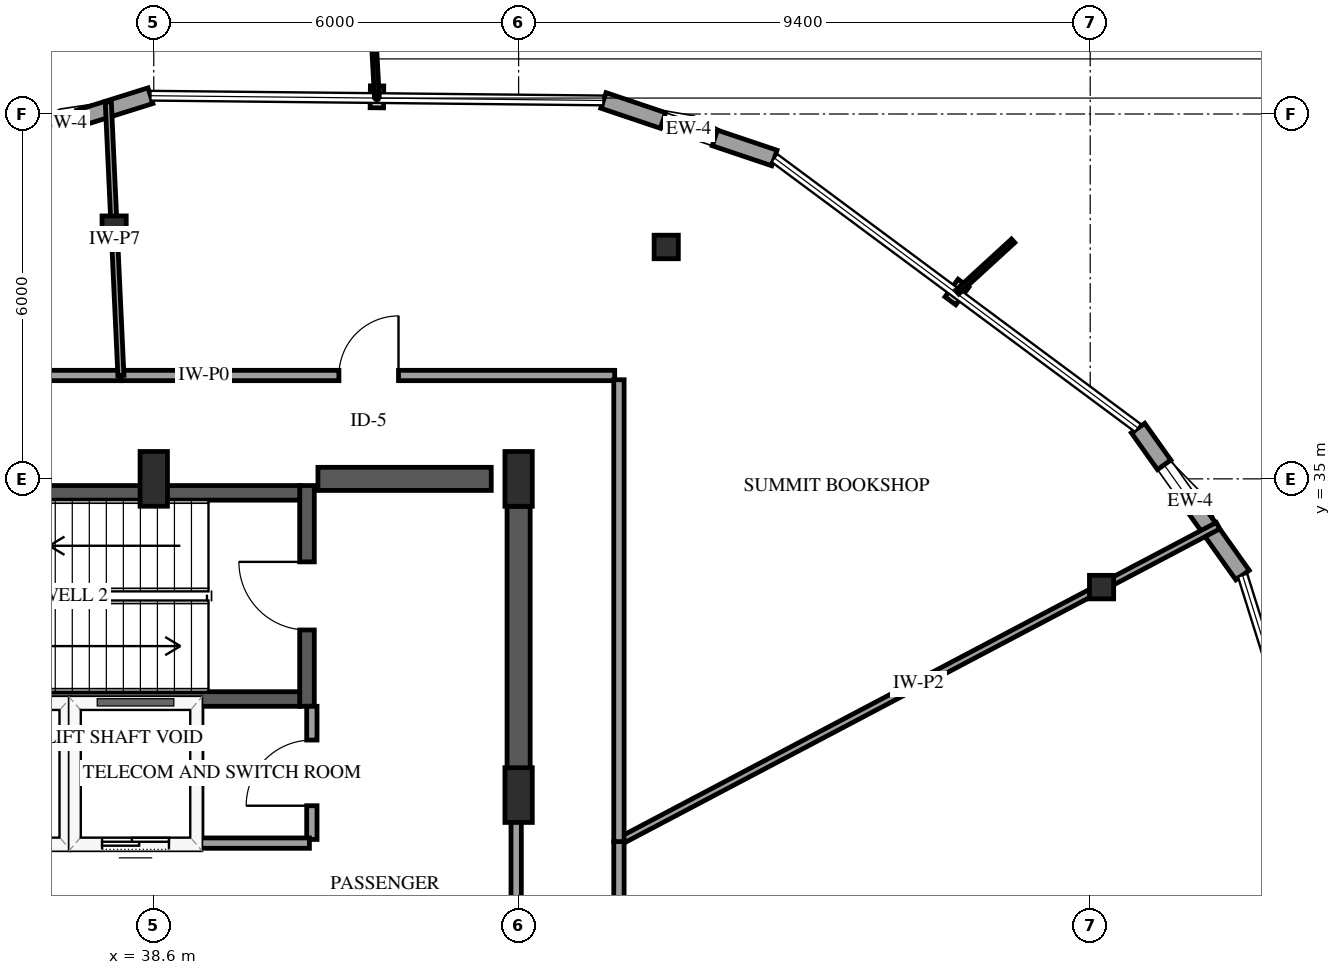
"""IFC4 building model, lengths in metres.
Left out: names, types, materials, properties, quantities, classifications, styles, units other than length and angle.
Written with IfcOpenShell. Run it as: python <this file> out.ifc"""

import sys

from ifc_helpers import new_model, si_unit, direction, frame, frame_2d, origin, origin_2d, place, context, subcontext, project, spatial, rectangle, i_section, extrude, element, fill, save


model = new_model("IFC4")
c1 = context("Model", 3, precision=1e-05, world=origin(), true_north=direction((0.0, 1.0)))
c2 = subcontext(c1, "Body", "Model", "MODEL_VIEW")
j1 = project(units=[si_unit("LENGTHUNIT", "METRE"), si_unit("PLANEANGLEUNIT", "RADIAN")], contexts=[c1])
p1 = place(None, origin())
s1 = spatial("IfcSite", under=j1, at=p1, CompositionType="ELEMENT")
p2 = place(p1, origin())
s2 = spatial("IfcBuilding", under=s1, at=p2, CompositionType="ELEMENT")
p3 = place(p2, frame((0.0, 0.0, 297.25)))
s3 = spatial("IfcBuildingStorey", under=s2, at=p3, CompositionType="ELEMENT", Elevation=297.25)
p4 = place(p3, frame((41.12, 31.26, 0.0), z_axis=(0.0, 0.0, 1.0), x_axis=(0.0, 1.0, 0.0)))
e1 = element("IfcWall", 1, at=p4, inside=s3, PredefinedType="SHEAR", context=c2, shape_type="SweptSolid", body=[
    extrude(rectangle(XDim=3.63, YDim=0.24, at=frame_2d((1.815, 0.0))), origin(), (0.0, 0.0, 1.0), 4.2),
])
p5 = place(p4, frame((1.255, 0.0, 0.0)))
e2 = element("IfcOpeningElement", 2, at=p5, cuts=e1, PredefinedType="OPENING", context=c2, shape_type="SweptSolid", body=[
    extrude(rectangle(XDim=1.12, YDim=2.15, at=frame_2d((0.56, 1.075))), frame((0.0, 0.13, 0.0), z_axis=(0.0, -1.0, 0.0), x_axis=(1.0, 0.0, 0.0)), (0.0, 0.0, 1.0), 0.26),
])
for number, where, z_axis, x_axis in (
    (3, (33.0, 31.38, 0.0), (0.0, 0.0, 1.0), (1.0, 0.0, 0.0)),
    (4, (33.0, 34.77, 0.0), (0.0, 0.0, 1.0), (1.0, 0.0, 0.0)),
):
    element("IfcWall", number, at=place(p3, frame(where, z_axis=z_axis, x_axis=x_axis)), inside=s3, PredefinedType="SHEAR", context=c2, shape_type="SweptSolid", body=[
        extrude(rectangle(XDim=8.0, YDim=0.24, at=frame_2d((4.0, 0.0))), origin(), (0.0, 0.0, 1.0), 4.2),
    ])
p6 = place(p3, frame((41.3, 35.0, 0.0), z_axis=(0.0, 0.0, 1.0), x_axis=(1.0, 0.0, 0.0)))
e5 = element("IfcWall", 5, at=p6, inside=s3, PredefinedType="SHEAR", context=c2, shape_type="SweptSolid", body=[
    extrude(rectangle(XDim=2.85, YDim=0.38, at=frame_2d((1.425, 0.0))), origin(), (0.0, 0.0, 1.0), 4.2),
])
p7 = place(p3, frame((44.6, 29.8, 0.0), z_axis=(0.0, 0.0, 1.0), x_axis=(0.0, 1.0, 0.0)))
e6 = element("IfcWall", 6, at=p7, inside=s3, PredefinedType="SHEAR", context=c2, shape_type="SweptSolid", body=[
    extrude(rectangle(XDim=4.75, YDim=0.38, at=frame_2d((2.375, 0.0))), origin(), (0.0, 0.0, 1.0), 4.2),
])
for number, where, z_axis, x_axis in (
    (7, (38.6, 35.0, 0.0), (0.0, 0.0, 1.0), (1.0, 0.0, 0.0)),
    (8, (44.6, 29.8, 0.0), (0.0, 0.0, 1.0), (1.0, 0.0, 0.0)),
    (9, (44.6, 35.0, 0.0), (0.0, 0.0, 1.0), (1.0, 0.0, 0.0)),
):
    element("IfcColumn", number, at=place(p3, frame(where, z_axis=z_axis, x_axis=x_axis)), inside=s3, PredefinedType="PILASTER", context=c2, shape_type="SweptSolid", body=[
        extrude(rectangle(XDim=0.45, YDim=0.9, at=origin_2d()), origin(), (0.0, 0.0, 1.0), 4.2),
    ])
for number, where, z_axis, x_axis in (
    (10, (54.187, 33.22, 0.0), (0.0, 0.0, 1.0), (1.0, 0.0, 0.0)),
    (11, (47.028, 38.813, 0.0), (0.0, 0.0, 1.0), (1.0, 0.0, 0.0)),
    (12, (37.948, 39.131, 0.0), (0.0, 0.0, 1.0), (1.0, 0.0, 0.0)),
):
    element("IfcColumn", number, at=place(p3, frame(where, z_axis=z_axis, x_axis=x_axis)), inside=s3, PredefinedType="COLUMN", context=c2, shape_type="SweptSolid", body=[
        extrude(i_section(OverallWidth=0.398, OverallDepth=0.387, WebThickness=0.021, FlangeThickness=0.033, FilletRadius=0.038, at=origin_2d()), origin(), (0.0, 0.0, 1.0), 4.2),
    ])
p8 = place(p3, frame((38.546, 41.301, 0.0), z_axis=(0.0, 0.0, 1.0), x_axis=(-0.954232173164, -0.299066814772, 0.0)))
e13 = element("IfcWall", 13, at=p8, inside=s3, PredefinedType="SOLIDWALL", context=c2, shape_type="SweptSolid", body=[
    extrude(rectangle(XDim=2.967, YDim=0.27, at=frame_2d((1.483, 0.0))), origin(), (0.0, 0.0, 1.0), 3.274),
])
p9 = place(p8, frame((1.228, 0.0, 0.75)))
e14 = element("IfcOpeningElement", 14, at=p9, cuts=e13, PredefinedType="OPENING", context=c2, shape_type="SweptSolid", body=[
    extrude(rectangle(XDim=0.9, YDim=1.5, at=frame_2d((0.45, 0.75))), frame((0.0, 0.145, 0.0), z_axis=(0.0, -1.0, 0.0), x_axis=(1.0, 0.0, 0.0)), (0.0, 0.0, 1.0), 0.29),
])
p10 = place(p3, frame((56.505, 33.417, 0.0), z_axis=(0.0, 0.0, 1.0), x_axis=(-0.579274768915, 0.81513234637, 0.0)))
e15 = element("IfcWall", 15, at=p10, inside=s3, PredefinedType="SOLIDWALL", context=c2, shape_type="SweptSolid", body=[
    extrude(rectangle(XDim=2.967, YDim=0.27, at=frame_2d((1.483, 0.0))), origin(), (0.0, 0.0, 1.0), 3.274),
])
p11 = place(p10, frame((1.325, 0.0, 0.75)))
e16 = element("IfcOpeningElement", 16, at=p11, cuts=e15, PredefinedType="OPENING", context=c2, shape_type="SweptSolid", body=[
    extrude(rectangle(XDim=0.9, YDim=1.5, at=frame_2d((0.45, 0.75))), frame((0.0, 0.145, 0.0), z_axis=(0.0, -1.0, 0.0), x_axis=(1.0, 0.0, 0.0)), (0.0, 0.0, 1.0), 0.29),
])
p12 = place(p3, frame((48.806, 40.277, 0.0), z_axis=(0.0, 0.0, 1.0), x_axis=(-0.947790765735, 0.318892872903, 0.0)))
e17 = element("IfcWall", 17, at=p12, inside=s3, PredefinedType="SOLIDWALL", context=c2, shape_type="SweptSolid", body=[
    extrude(rectangle(XDim=2.967, YDim=0.27, at=frame_2d((1.483, 0.0))), origin(), (0.0, 0.0, 1.0), 3.274),
])
p13 = place(p12, frame((1.033, 0.0, 0.75)))
e18 = element("IfcOpeningElement", 18, at=p13, cuts=e17, PredefinedType="OPENING", context=c2, shape_type="SweptSolid", body=[
    extrude(rectangle(XDim=0.9, YDim=1.5, at=frame_2d((0.45, 0.75))), frame((0.0, 0.145, 0.0), z_axis=(0.0, -1.0, 0.0), x_axis=(1.0, 0.0, 0.0)), (0.0, 0.0, 1.0), 0.29),
])
p14 = place(p3, frame((35.15, 29.0, 0.0), z_axis=(0.0, 0.0, 1.0), x_axis=(1.0, 0.0, 0.0)))
e19 = element("IfcWall", 19, at=p14, inside=s3, PredefinedType="SOLIDWALL", context=c2, shape_type="SweptSolid", body=[
    extrude(rectangle(XDim=2.0, YDim=0.185, at=frame_2d((1.0, 0.0))), origin(), (0.0, 0.0, 1.0), 3.895),
])
p15 = place(p14, frame((0.45, 0.0, 0.0)))
e20 = element("IfcOpeningElement", 20, at=p15, cuts=e19, PredefinedType="OPENING", context=c2, shape_type="SweptSolid", body=[
    extrude(rectangle(XDim=1.1, YDim=2.15, at=frame_2d((0.55, 1.075))), frame((0.0, 0.103, 0.0), z_axis=(0.0, -1.0, 0.0), x_axis=(1.0, 0.0, 0.0)), (0.0, 0.0, 1.0), 0.205),
])
p16 = place(p3, frame((37.15, 29.11, 0.0), z_axis=(0.0, 0.0, 1.0), x_axis=(0.0, 1.0, 0.0)))
e21 = element("IfcWall", 21, at=p16, inside=s3, PredefinedType="SOLIDWALL", context=c2, shape_type="SweptSolid", body=[
    extrude(rectangle(XDim=2.1, YDim=0.185, at=frame_2d((1.05, 0.0))), origin(), (0.0, 0.0, 1.0), 3.895),
])
p17 = place(p3, frame((37.3, 29.0, 0.0), z_axis=(0.0, 0.0, 1.0), x_axis=(1.0, 0.0, 0.0)))
e22 = element("IfcWall", 22, at=p17, inside=s3, PredefinedType="SOLIDWALL", context=c2, shape_type="SweptSolid", body=[
    extrude(rectangle(XDim=2.0, YDim=0.185, at=frame_2d((1.0, 0.0))), origin(), (0.0, 0.0, 1.0), 3.895),
])
p18 = place(p17, frame((0.45, 0.0, 0.0)))
e23 = element("IfcOpeningElement", 23, at=p18, cuts=e22, PredefinedType="OPENING", context=c2, shape_type="SweptSolid", body=[
    extrude(rectangle(XDim=1.1, YDim=2.15, at=frame_2d((0.55, 1.075))), frame((0.0, 0.103, 0.0), z_axis=(0.0, -1.0, 0.0), x_axis=(1.0, 0.0, 0.0)), (0.0, 0.0, 1.0), 0.205),
])
p19 = place(p3, frame((39.3, 29.11, 0.0), z_axis=(0.0, 0.0, 1.0), x_axis=(0.0, 1.0, 0.0)))
e24 = element("IfcWall", 24, at=p19, inside=s3, PredefinedType="SOLIDWALL", context=c2, shape_type="SweptSolid", body=[
    extrude(rectangle(XDim=2.1, YDim=0.185, at=frame_2d((1.05, 0.0))), origin(), (0.0, 0.0, 1.0), 3.895),
])
p20 = place(p3, frame((56.102, 34.23, 0.0), z_axis=(0.0, 0.0, 1.0), x_axis=(-0.884556110355, -0.466433797697, 0.0)))
e25 = element("IfcWall", 25, at=p20, inside=s3, PredefinedType="PARTITIONING", context=c2, shape_type="SweptSolid", body=[
    extrude(rectangle(XDim=11.138, YDim=0.12, at=frame_2d((5.569, 0.0))), origin(), (0.0, 0.0, 1.0), 3.273),
])
p21 = place(p3, frame((46.25, 29.035, 0.0), z_axis=(0.0, 0.0, 1.0), x_axis=(0.0, -1.0, 0.0)))
e26 = element("IfcWall", 26, at=p21, inside=s3, PredefinedType="PARTITIONING", context=c2, shape_type="SweptSolid", body=[
    extrude(rectangle(XDim=8.656, YDim=0.17, at=frame_2d((4.328, 0.0))), origin(), (0.0, 0.0, 1.0), 3.895),
])
p22 = place(p21, frame((3.853, 0.0, 0.0)))
e27 = element("IfcOpeningElement", 27, at=p22, cuts=e26, PredefinedType="OPENING", context=c2, shape_type="SweptSolid", body=[
    extrude(rectangle(XDim=0.98, YDim=2.15, at=frame_2d((0.49, 1.075))), frame((0.0, 0.095, 0.0), z_axis=(0.0, -1.0, 0.0), x_axis=(1.0, 0.0, 0.0)), (0.0, 0.0, 1.0), 0.19),
])
p23 = place(p3, frame((38.06, 36.7, 0.0), z_axis=(0.0, 0.0, 1.0), x_axis=(1.0, 0.0, 0.0)))
e28 = element("IfcWall", 28, at=p23, inside=s3, PredefinedType="PARTITIONING", context=c2, shape_type="SweptSolid", body=[
    extrude(rectangle(XDim=8.12, YDim=0.17, at=frame_2d((4.06, 0.0))), origin(), (0.0, 0.0, 1.0), 3.895),
])
p24 = place(p23, frame((3.585, 0.0, 0.0)))
e29 = element("IfcOpeningElement", 29, at=p24, cuts=e28, PredefinedType="OPENING", context=c2, shape_type="SweptSolid", body=[
    extrude(rectangle(XDim=0.98, YDim=2.15, at=frame_2d((0.49, 1.075))), frame((0.0, 0.095, 0.0), z_axis=(0.0, -1.0, 0.0), x_axis=(1.0, 0.0, 0.0)), (0.0, 0.0, 1.0), 0.19),
])
p25 = place(p3, frame((46.25, 36.63, 0.0), z_axis=(0.0, 0.0, 1.0), x_axis=(0.0, -1.0, 0.0)))
e30 = element("IfcWall", 30, at=p25, inside=s3, PredefinedType="PARTITIONING", context=c2, shape_type="SweptSolid", body=[
    extrude(rectangle(XDim=7.595, YDim=0.17, at=frame_2d((3.797, 0.0))), origin(), (0.0, 0.0, 1.0), 3.895),
])
p26 = place(p3, frame((44.56, 29.8, 0.0), z_axis=(0.0, 0.0, 1.0), x_axis=(0.0, -1.0, 0.0)))
e31 = element("IfcWall", 31, at=p26, inside=s3, PredefinedType="PARTITIONING", context=c2, shape_type="SweptSolid", body=[
    extrude(rectangle(XDim=6.91, YDim=0.17, at=frame_2d((3.455, 0.0))), origin(), (0.0, 0.0, 1.0), 2.935),
])
p27 = place(p26, frame((2.915, 0.0, 0.0)))
e32 = element("IfcOpeningElement", 32, at=p27, cuts=e31, PredefinedType="OPENING", context=c2, shape_type="SweptSolid", body=[
    extrude(rectangle(XDim=1.08, YDim=2.15, at=frame_2d((0.54, 1.075))), frame((0.0, 0.095, 0.0), z_axis=(0.0, -1.0, 0.0), x_axis=(1.0, 0.0, 0.0)), (0.0, 0.0, 1.0), 0.19),
])
p28 = place(p3, frame((32.67, 36.7, 0.0), z_axis=(0.0, 0.0, 1.0), x_axis=(1.0, 0.0, 0.0)))
e33 = element("IfcWall", 33, at=p28, inside=s3, PredefinedType="PARTITIONING", context=c2, shape_type="SweptSolid", body=[
    extrude(rectangle(XDim=5.39, YDim=0.17, at=frame_2d((2.695, 0.0))), origin(), (0.0, 0.0, 1.0), 3.895),
])
p29 = place(p28, frame((2.22, 0.0, 0.0)))
e34 = element("IfcOpeningElement", 34, at=p29, cuts=e33, PredefinedType="OPENING", context=c2, shape_type="SweptSolid", body=[
    extrude(rectangle(XDim=0.98, YDim=2.15, at=frame_2d((0.49, 1.075))), frame((0.0, 0.095, 0.0), z_axis=(0.0, -1.0, 0.0), x_axis=(1.0, 0.0, 0.0)), (0.0, 0.0, 1.0), 0.19),
])
p30 = place(p3, frame((38.06, 36.7, 0.0), z_axis=(0.0, 0.0, 1.0), x_axis=(-0.046184656357, 0.998932919428, 0.0)))
e35 = element("IfcWall", 35, at=p30, inside=s3, PredefinedType="PARTITIONING", context=c2, shape_type="SweptSolid", body=[
    extrude(rectangle(XDim=4.504, YDim=0.1, at=frame_2d((2.252, 0.0))), origin(), (0.0, 0.0, 1.0), 3.19),
])
p31 = place(p3, frame((41.2, 29.07, 0.0), z_axis=(0.0, 0.0, 1.0), x_axis=(0.0, 1.0, 0.0)))
e36 = element("IfcWall", 36, at=p31, inside=s3, PredefinedType="PARTITIONING", context=c2, shape_type="SweptSolid", body=[
    extrude(rectangle(XDim=2.19, YDim=0.17, at=frame_2d((1.095, 0.0))), origin(), (0.0, 0.0, 1.0), 3.895),
])
p32 = place(p31, frame((0.555, 0.0, 0.0)))
e37 = element("IfcOpeningElement", 37, at=p32, cuts=e36, PredefinedType="OPENING", context=c2, shape_type="SweptSolid", body=[
    extrude(rectangle(XDim=1.08, YDim=2.15, at=frame_2d((0.54, 1.075))), frame((0.0, 0.095, 0.0), z_axis=(0.0, -1.0, 0.0), x_axis=(1.0, 0.0, 0.0)), (0.0, 0.0, 1.0), 0.19),
])
p33 = place(p3, frame((39.3, 29.01, 0.0), z_axis=(0.0, 0.0, 1.0), x_axis=(1.0, 0.0, 0.0)))
e38 = element("IfcWall", 38, at=p33, inside=s3, PredefinedType="PARTITIONING", context=c2, shape_type="SweptSolid", body=[
    extrude(rectangle(XDim=1.86, YDim=0.17, at=frame_2d((0.93, 0.0))), origin(), (0.0, 0.0, 1.0), 3.895),
])
p34 = place(p9, origin())
e39 = element("IfcWindow", 39, at=p34, inside=s3, PartitioningType="SINGLE_PANEL", PredefinedType="WINDOW", context=c2, shape_type="SweptSolid", body=[
    extrude(rectangle(XDim=0.9, YDim=1.5, at=frame_2d((0.45, 0.75))), frame((0.0, 0.03, 0.0), z_axis=(0.0, -1.0, 0.0), x_axis=(1.0, 0.0, 0.0)), (0.0, 0.0, 1.0), 0.06),
])
fill(e14, e39)
p35 = place(p11, origin())
e40 = element("IfcWindow", 40, at=p35, inside=s3, PartitioningType="SINGLE_PANEL", PredefinedType="WINDOW", context=c2, shape_type="SweptSolid", body=[
    extrude(rectangle(XDim=0.9, YDim=1.5, at=frame_2d((0.45, 0.75))), frame((0.0, 0.03, 0.0), z_axis=(0.0, -1.0, 0.0), x_axis=(1.0, 0.0, 0.0)), (0.0, 0.0, 1.0), 0.06),
])
fill(e16, e40)
p36 = place(p13, origin())
e41 = element("IfcWindow", 41, at=p36, inside=s3, PartitioningType="SINGLE_PANEL", PredefinedType="WINDOW", context=c2, shape_type="SweptSolid", body=[
    extrude(rectangle(XDim=0.9, YDim=1.5, at=frame_2d((0.45, 0.75))), frame((0.0, 0.03, 0.0), z_axis=(0.0, -1.0, 0.0), x_axis=(1.0, 0.0, 0.0)), (0.0, 0.0, 1.0), 0.06),
])
fill(e18, e41)
p37 = place(p18, origin())
e42 = element("IfcDoor", 42, at=p37, inside=s3, OperationType="SLIDING_TO_LEFT", PredefinedType="DOOR", context=c2, shape_type="SweptSolid", body=[
    extrude(rectangle(XDim=1.1, YDim=2.15, at=frame_2d((0.55, 1.075))), frame((0.0, 0.025, 0.0), z_axis=(0.0, -1.0, 0.0), x_axis=(1.0, 0.0, 0.0)), (0.0, 0.0, 1.0), 0.05),
])
fill(e23, e42)
p38 = place(p5, origin())
e43 = element("IfcDoor", 43, at=p38, inside=s3, OperationType="SINGLE_SWING_RIGHT", PredefinedType="DOOR", context=c2, shape_type="SweptSolid", body=[
    extrude(rectangle(XDim=1.12, YDim=2.15, at=frame_2d((0.56, 1.075))), frame((0.0, 0.025, 0.0), z_axis=(0.0, -1.0, 0.0), x_axis=(1.0, 0.0, 0.0)), (0.0, 0.0, 1.0), 0.05),
])
fill(e2, e43)
p39 = place(p24, origin())
e44 = element("IfcDoor", 44, at=p39, inside=s3, OperationType="SINGLE_SWING_RIGHT", PredefinedType="DOOR", context=c2, shape_type="SweptSolid", body=[
    extrude(rectangle(XDim=0.98, YDim=2.15, at=frame_2d((0.49, 1.075))), frame((0.0, 0.025, 0.0), z_axis=(0.0, -1.0, 0.0), x_axis=(1.0, 0.0, 0.0)), (0.0, 0.0, 1.0), 0.05),
])
fill(e29, e44)
p40 = place(p32, origin())
e45 = element("IfcDoor", 45, at=p40, inside=s3, OperationType="SINGLE_SWING_LEFT", PredefinedType="DOOR", context=c2, shape_type="SweptSolid", body=[
    extrude(rectangle(XDim=1.08, YDim=2.15, at=frame_2d((0.54, 1.075))), frame((0.0, 0.025, 0.0), z_axis=(0.0, -1.0, 0.0), x_axis=(1.0, 0.0, 0.0)), (0.0, 0.0, 1.0), 0.05),
])
fill(e37, e45)
save(model, sys.argv[1])
